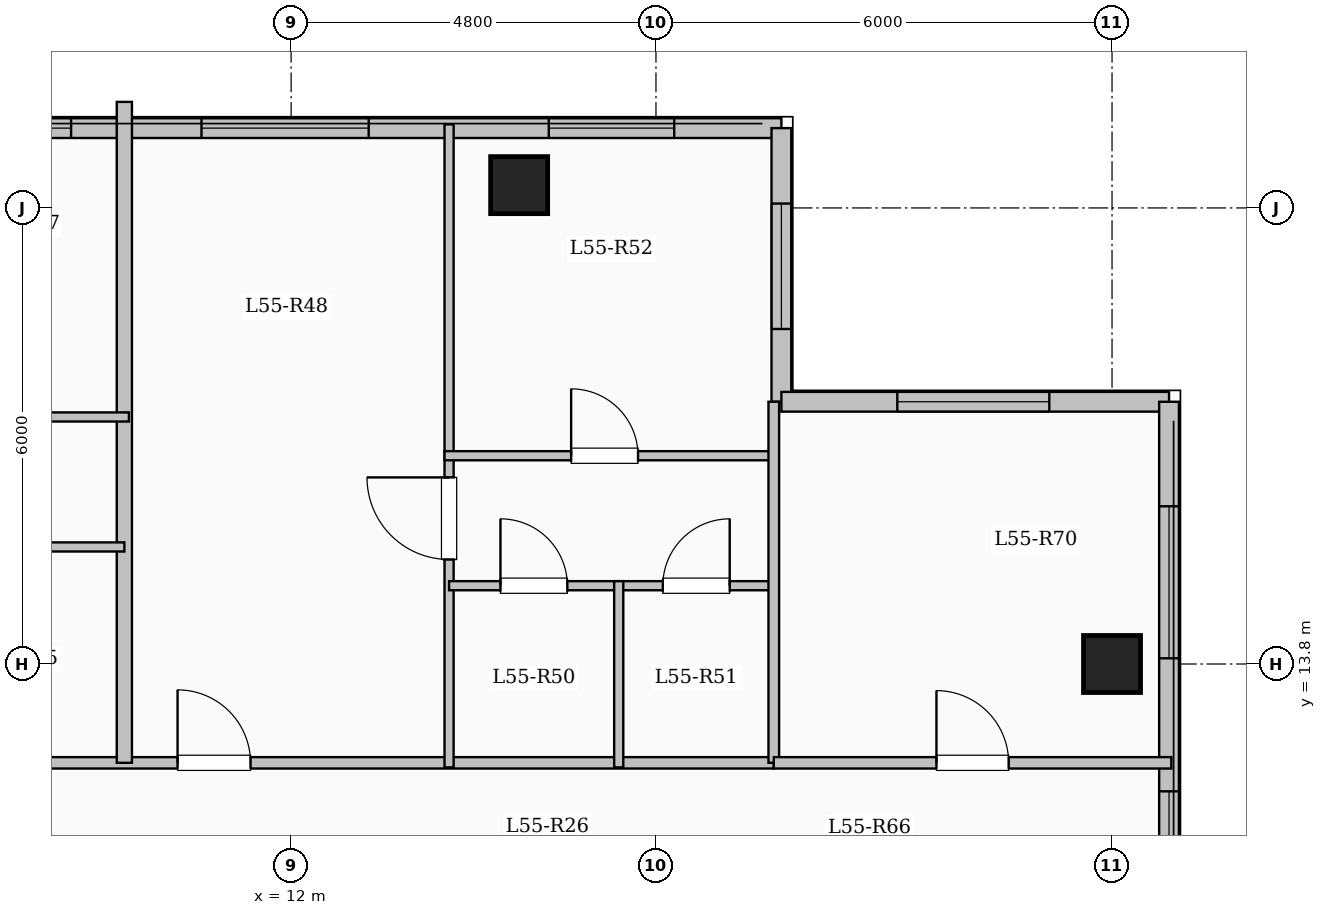
"""IFC4 building model, lengths in metres.
Left out: names, types, materials, properties, quantities, classifications, styles, units other than length and angle.
Written with IfcOpenShell. Run it as: python <this file> out.ifc"""

import sys

from ifc_helpers import new_model, si_unit, direction, frame, frame_2d, origin, origin_2d, place, context, subcontext, project, spatial, rectangle, extrude, element, fill, save


model = new_model("IFC4")
c1 = context("Model", 3, precision=1e-05, world=origin(), true_north=direction((0.0, 1.0)))
c2 = subcontext(c1, "Body", "Model", "MODEL_VIEW")
j1 = project(units=[si_unit("LENGTHUNIT", "METRE"), si_unit("PLANEANGLEUNIT", "RADIAN")], contexts=[c1])
p1 = place(None, origin())
s1 = spatial("IfcSite", under=j1, at=p1, CompositionType="ELEMENT")
p2 = place(p1, origin())
s2 = spatial("IfcBuilding", under=s1, at=p2, CompositionType="ELEMENT")
p3 = place(p2, frame((0.0, 0.0, 203.65)))
s3 = spatial("IfcBuildingStorey", under=s2, at=p3, CompositionType="ELEMENT", Elevation=203.65)
for number, where, z_axis, x_axis in (
    (1, (15.0, 20.1, 0.0), (0.0, 0.0, 1.0), (1.0, 0.0, 0.0)),
    (2, (22.8, 13.8, 0.0), (0.0, 0.0, 1.0), (1.0, 0.0, 0.0)),
):
    element("IfcColumn", number, at=place(p3, frame(where, z_axis=z_axis, x_axis=x_axis)), inside=s3, PredefinedType="COLUMN", context=c2, shape_type="SweptSolid", body=[
        extrude(rectangle(XDim=0.75, YDim=0.75, at=origin_2d()), origin(), (0.0, 0.0, 1.0), 3.35),
    ])
p4 = place(p3, frame((7.35, 20.85, 0.0), z_axis=(0.0, 0.0, 1.0), x_axis=(1.0, 0.0, 0.0)))
e3 = element("IfcWall", 3, at=p4, inside=s3, PredefinedType="SOLIDWALL", context=c2, shape_type="SweptSolid", body=[
    extrude(rectangle(XDim=11.1, YDim=0.26, at=frame_2d((5.55, 0.0))), origin(), (0.0, 0.0, 1.0), 3.1),
])
p5 = place(p4, frame((0.555, 0.0, 0.95)))
e4 = element("IfcOpeningElement", 4, at=p5, cuts=e3, PredefinedType="OPENING", context=c2, shape_type="SweptSolid", body=[
    extrude(rectangle(XDim=1.2, YDim=1.5, at=frame_2d((0.6, 0.75))), frame((0.0, 0.14, 0.0), z_axis=(0.0, -1.0, 0.0), x_axis=(1.0, 0.0, 0.0)), (0.0, 0.0, 1.0), 0.28),
])
p6 = place(p4, frame((3.471, 0.0, 0.9)))
e5 = element("IfcOpeningElement", 5, at=p6, cuts=e3, PredefinedType="OPENING", context=c2, shape_type="SweptSolid", body=[
    extrude(rectangle(XDim=2.2, YDim=1.75, at=frame_2d((1.1, 0.875))), frame((0.0, 0.14, 0.0), z_axis=(0.0, -1.0, 0.0), x_axis=(1.0, 0.0, 0.0)), (0.0, 0.0, 1.0), 0.28),
])
p7 = place(p4, frame((8.04, 0.0, 0.9)))
e6 = element("IfcOpeningElement", 6, at=p7, cuts=e3, PredefinedType="OPENING", context=c2, shape_type="SweptSolid", body=[
    extrude(rectangle(XDim=1.65, YDim=1.6, at=frame_2d((0.825, 0.8))), frame((0.0, 0.14, 0.0), z_axis=(0.0, -1.0, 0.0), x_axis=(1.0, 0.0, 0.0)), (0.0, 0.0, 1.0), 0.28),
])
p8 = place(p3, frame((18.45, 20.85, 0.0), z_axis=(0.0, 0.0, 1.0), x_axis=(0.0, -1.0, 0.0)))
e7 = element("IfcWall", 7, at=p8, inside=s3, PredefinedType="SOLIDWALL", context=c2, shape_type="SweptSolid", body=[
    extrude(rectangle(XDim=3.6, YDim=0.26, at=frame_2d((1.8, 0.0))), origin(), (0.0, 0.0, 1.0), 3.1),
])
p9 = place(p8, frame((0.992, 0.0, 0.9)))
e8 = element("IfcOpeningElement", 8, at=p9, cuts=e7, PredefinedType="OPENING", context=c2, shape_type="SweptSolid", body=[
    extrude(rectangle(XDim=1.65, YDim=1.6, at=frame_2d((0.825, 0.8))), frame((0.0, 0.14, 0.0), z_axis=(0.0, -1.0, 0.0), x_axis=(1.0, 0.0, 0.0)), (0.0, 0.0, 1.0), 0.28),
])
p10 = place(p3, frame((18.45, 17.25, 0.0), z_axis=(0.0, 0.0, 1.0), x_axis=(1.0, 0.0, 0.0)))
e9 = element("IfcWall", 9, at=p10, inside=s3, PredefinedType="SOLIDWALL", context=c2, shape_type="SweptSolid", body=[
    extrude(rectangle(XDim=5.1, YDim=0.26, at=frame_2d((2.55, 0.0))), origin(), (0.0, 0.0, 1.0), 3.1),
])
p11 = place(p10, frame((1.525, 0.0, 0.9)))
e10 = element("IfcOpeningElement", 10, at=p11, cuts=e9, PredefinedType="OPENING", context=c2, shape_type="SweptSolid", body=[
    extrude(rectangle(XDim=2.0, YDim=1.7, at=frame_2d((1.0, 0.85))), frame((0.0, 0.14, 0.0), z_axis=(0.0, -1.0, 0.0), x_axis=(1.0, 0.0, 0.0)), (0.0, 0.0, 1.0), 0.28),
])
p12 = place(p3, frame((23.55, 17.25, 0.0), z_axis=(0.0, 0.0, 1.0), x_axis=(0.0, -1.0, 0.0)))
e11 = element("IfcWall", 11, at=p12, inside=s3, PredefinedType="SOLIDWALL", context=c2, shape_type="SweptSolid", body=[
    extrude(rectangle(XDim=34.5, YDim=0.26, at=frame_2d((17.25, 0.0))), origin(), (0.0, 0.0, 1.0), 3.1),
])
p13 = place(p12, frame((1.375, 0.0, 0.9)))
e12 = element("IfcOpeningElement", 12, at=p13, cuts=e11, PredefinedType="OPENING", context=c2, shape_type="SweptSolid", body=[
    extrude(rectangle(XDim=2.0, YDim=1.7, at=frame_2d((1.0, 0.85))), frame((0.0, 0.14, 0.0), z_axis=(0.0, -1.0, 0.0), x_axis=(1.0, 0.0, 0.0)), (0.0, 0.0, 1.0), 0.28),
])
p14 = place(p12, frame((5.125, 0.0, 0.95)))
e13 = element("IfcOpeningElement", 13, at=p14, cuts=e11, PredefinedType="OPENING", context=c2, shape_type="SweptSolid", body=[
    extrude(rectangle(XDim=1.0, YDim=1.5, at=frame_2d((0.5, 0.75))), frame((0.0, 0.14, 0.0), z_axis=(0.0, -1.0, 0.0), x_axis=(1.0, 0.0, 0.0)), (0.0, 0.0, 1.0), 0.28),
])
p15 = place(p12, frame((8.375, 0.0, 0.9)))
e14 = element("IfcOpeningElement", 14, at=p15, cuts=e11, PredefinedType="OPENING", context=c2, shape_type="SweptSolid", body=[
    extrude(rectangle(XDim=2.0, YDim=1.7, at=frame_2d((1.0, 0.85))), frame((0.0, 0.14, 0.0), z_axis=(0.0, -1.0, 0.0), x_axis=(1.0, 0.0, 0.0)), (0.0, 0.0, 1.0), 0.28),
])
p16 = place(p12, frame((13.2, 0.0, 0.9)))
e15 = element("IfcOpeningElement", 15, at=p16, cuts=e11, PredefinedType="OPENING", context=c2, shape_type="SweptSolid", body=[
    extrude(rectangle(XDim=1.65, YDim=1.6, at=frame_2d((0.825, 0.8))), frame((0.0, 0.14, 0.0), z_axis=(0.0, -1.0, 0.0), x_axis=(1.0, 0.0, 0.0)), (0.0, 0.0, 1.0), 0.28),
])
p17 = place(p12, frame((19.05, 0.0, 0.9)))
e16 = element("IfcOpeningElement", 16, at=p17, cuts=e11, PredefinedType="OPENING", context=c2, shape_type="SweptSolid", body=[
    extrude(rectangle(XDim=2.2, YDim=1.75, at=frame_2d((1.1, 0.875))), frame((0.0, 0.14, 0.0), z_axis=(0.0, -1.0, 0.0), x_axis=(1.0, 0.0, 0.0)), (0.0, 0.0, 1.0), 0.28),
])
p18 = place(p12, frame((24.975, 0.0, 0.95)))
e17 = element("IfcOpeningElement", 17, at=p18, cuts=e11, PredefinedType="OPENING", context=c2, shape_type="SweptSolid", body=[
    extrude(rectangle(XDim=1.2, YDim=1.5, at=frame_2d((0.6, 0.75))), frame((0.0, 0.14, 0.0), z_axis=(0.0, -1.0, 0.0), x_axis=(1.0, 0.0, 0.0)), (0.0, 0.0, 1.0), 0.28),
])
p19 = place(p12, frame((29.475, 0.0, 0.9)))
e18 = element("IfcOpeningElement", 18, at=p19, cuts=e11, PredefinedType="OPENING", context=c2, shape_type="SweptSolid", body=[
    extrude(rectangle(XDim=2.2, YDim=1.75, at=frame_2d((1.1, 0.875))), frame((0.0, 0.14, 0.0), z_axis=(0.0, -1.0, 0.0), x_axis=(1.0, 0.0, 0.0)), (0.0, 0.0, 1.0), 0.28),
])
p20 = place(p3, frame((3.85, 12.5, 0.0), z_axis=(0.0, 0.0, 1.0), x_axis=(1.0, 0.0, 0.0)))
e19 = element("IfcWall", 19, at=p20, inside=s3, PredefinedType="PARTITIONING", context=c2, shape_type="SweptSolid", body=[
    extrude(rectangle(XDim=14.5, YDim=0.15, at=frame_2d((7.25, 0.0))), origin(), (0.0, 0.0, 1.0), 3.1),
])
p21 = place(p20, frame((0.7, 0.0, 0.0)))
e20 = element("IfcOpeningElement", 20, at=p21, cuts=e19, PredefinedType="OPENING", context=c2, shape_type="SweptSolid", body=[
    extrude(rectangle(XDim=0.96, YDim=2.15, at=frame_2d((0.48, 1.075))), frame((0.0, 0.085, 0.0), z_axis=(0.0, -1.0, 0.0), x_axis=(1.0, 0.0, 0.0)), (0.0, 0.0, 1.0), 0.17),
])
p22 = place(p20, frame((6.656, 0.0, 0.0)))
e21 = element("IfcOpeningElement", 21, at=p22, cuts=e19, PredefinedType="OPENING", context=c2, shape_type="SweptSolid", body=[
    extrude(rectangle(XDim=0.96, YDim=2.15, at=frame_2d((0.48, 1.075))), frame((0.0, 0.085, 0.0), z_axis=(0.0, -1.0, 0.0), x_axis=(1.0, 0.0, 0.0)), (0.0, 0.0, 1.0), 0.17),
])
p23 = place(p3, frame((9.806, 12.5, 0.0), z_axis=(0.0, 0.0, 1.0), x_axis=(0.0, 1.0, 0.0)))
e22 = element("IfcWall", 22, at=p23, inside=s3, PredefinedType="SOLIDWALL", context=c2, shape_type="SweptSolid", body=[
    extrude(rectangle(XDim=8.695, YDim=0.2, at=frame_2d((4.348, 0.0))), origin(), (0.0, 0.0, 1.0), 3.1),
])
p24 = place(p3, frame((6.95, 15.34, 0.0), z_axis=(0.0, 0.0, 1.0), x_axis=(1.0, 0.0, 0.0)))
e23 = element("IfcWall", 23, at=p24, inside=s3, PredefinedType="PARTITIONING", context=c2, shape_type="SweptSolid", body=[
    extrude(rectangle(XDim=2.856, YDim=0.12, at=frame_2d((1.428, 0.0))), origin(), (0.0, 0.0, 1.0), 2.725),
])
p25 = place(p24, frame((0.988, 0.0, 0.0)))
e24 = element("IfcOpeningElement", 24, at=p25, cuts=e23, PredefinedType="OPENING", context=c2, shape_type="SweptSolid", body=[
    extrude(rectangle(XDim=0.88, YDim=2.1, at=frame_2d((0.44, 1.05))), frame((0.0, 0.07, 0.0), z_axis=(0.0, -1.0, 0.0), x_axis=(1.0, 0.0, 0.0)), (0.0, 0.0, 1.0), 0.14),
])
p26 = place(p3, frame((4.204, 17.05, 0.0), z_axis=(0.0, 0.0, 1.0), x_axis=(1.0, 0.0, 0.0)))
e25 = element("IfcWall", 25, at=p26, inside=s3, PredefinedType="PARTITIONING", context=c2, shape_type="SweptSolid", body=[
    extrude(rectangle(XDim=5.662, YDim=0.12, at=frame_2d((2.831, 0.0))), origin(), (0.0, 0.0, 1.0), 2.725),
])
p27 = place(p26, frame((0.93, 0.0, 0.0)))
e26 = element("IfcOpeningElement", 26, at=p27, cuts=e25, PredefinedType="OPENING", context=c2, shape_type="SweptSolid", body=[
    extrude(rectangle(XDim=0.88, YDim=2.1, at=frame_2d((0.44, 1.05))), frame((0.0, 0.07, 0.0), z_axis=(0.0, -1.0, 0.0), x_axis=(1.0, 0.0, 0.0)), (0.0, 0.0, 1.0), 0.14),
])
p28 = place(p26, frame((3.671, 0.0, 0.0)))
e27 = element("IfcOpeningElement", 27, at=p28, cuts=e25, PredefinedType="OPENING", context=c2, shape_type="SweptSolid", body=[
    extrude(rectangle(XDim=0.88, YDim=2.1, at=frame_2d((0.44, 1.05))), frame((0.0, 0.07, 0.0), z_axis=(0.0, -1.0, 0.0), x_axis=(1.0, 0.0, 0.0)), (0.0, 0.0, 1.0), 0.14),
])
p29 = place(p3, frame((14.078, 12.44, 0.0), z_axis=(0.0, 0.0, 1.0), x_axis=(0.0, 1.0, 0.0)))
e28 = element("IfcWall", 28, at=p29, inside=s3, PredefinedType="PARTITIONING", context=c2, shape_type="SweptSolid", body=[
    extrude(rectangle(XDim=8.46, YDim=0.12, at=frame_2d((4.23, 0.0))), origin(), (0.0, 0.0, 1.0), 3.1),
])
p30 = place(p29, frame((2.735, 0.0, 0.0)))
e29 = element("IfcOpeningElement", 29, at=p30, cuts=e28, PredefinedType="OPENING", context=c2, shape_type="SweptSolid", body=[
    extrude(rectangle(XDim=1.08, YDim=2.15, at=frame_2d((0.54, 1.075))), frame((0.0, 0.07, 0.0), z_axis=(0.0, -1.0, 0.0), x_axis=(1.0, 0.0, 0.0)), (0.0, 0.0, 1.0), 0.14),
])
p31 = place(p3, frame((14.078, 14.83, 0.0), z_axis=(0.0, 0.0, 1.0), x_axis=(1.0, 0.0, 0.0)))
e30 = element("IfcWall", 30, at=p31, inside=s3, PredefinedType="PARTITIONING", context=c2, shape_type="SweptSolid", body=[
    extrude(rectangle(XDim=2.232, YDim=0.12, at=frame_2d((1.116, 0.0))), origin(), (0.0, 0.0, 1.0), 3.1),
])
p32 = place(p31, frame((0.676, 0.0, 0.0)))
e31 = element("IfcOpeningElement", 31, at=p32, cuts=e30, PredefinedType="OPENING", context=c2, shape_type="SweptSolid", body=[
    extrude(rectangle(XDim=0.88, YDim=2.1, at=frame_2d((0.44, 1.05))), frame((0.0, 0.07, 0.0), z_axis=(0.0, -1.0, 0.0), x_axis=(1.0, 0.0, 0.0)), (0.0, 0.0, 1.0), 0.14),
])
p33 = place(p3, frame((16.31, 14.83, 0.0), z_axis=(0.0, 0.0, 1.0), x_axis=(1.0, 0.0, 0.0)))
e32 = element("IfcWall", 32, at=p33, inside=s3, PredefinedType="PARTITIONING", context=c2, shape_type="SweptSolid", body=[
    extrude(rectangle(XDim=2.04, YDim=0.12, at=frame_2d((1.02, 0.0))), origin(), (0.0, 0.0, 1.0), 3.1),
])
p34 = place(p33, frame((0.58, 0.0, 0.0)))
e33 = element("IfcOpeningElement", 33, at=p34, cuts=e32, PredefinedType="OPENING", context=c2, shape_type="SweptSolid", body=[
    extrude(rectangle(XDim=0.88, YDim=2.1, at=frame_2d((0.44, 1.05))), frame((0.0, 0.07, 0.0), z_axis=(0.0, -1.0, 0.0), x_axis=(1.0, 0.0, 0.0)), (0.0, 0.0, 1.0), 0.14),
])
p35 = place(p3, frame((14.018, 16.54, 0.0), z_axis=(0.0, 0.0, 1.0), x_axis=(1.0, 0.0, 0.0)))
e34 = element("IfcWall", 34, at=p35, inside=s3, PredefinedType="PARTITIONING", context=c2, shape_type="SweptSolid", body=[
    extrude(rectangle(XDim=4.392, YDim=0.12, at=frame_2d((2.196, 0.0))), origin(), (0.0, 0.0, 1.0), 3.1),
])
p36 = place(p35, frame((1.666, 0.0, 0.0)))
e35 = element("IfcOpeningElement", 35, at=p36, cuts=e34, PredefinedType="OPENING", context=c2, shape_type="SweptSolid", body=[
    extrude(rectangle(XDim=0.88, YDim=2.1, at=frame_2d((0.44, 1.05))), frame((0.0, 0.07, 0.0), z_axis=(0.0, -1.0, 0.0), x_axis=(1.0, 0.0, 0.0)), (0.0, 0.0, 1.0), 0.14),
])
p37 = place(p3, frame((16.31, 12.44, 0.0), z_axis=(0.0, 0.0, 1.0), x_axis=(0.0, 1.0, 0.0)))
e36 = element("IfcWall", 36, at=p37, inside=s3, PredefinedType="PARTITIONING", context=c2, shape_type="SweptSolid", body=[
    extrude(rectangle(XDim=2.45, YDim=0.12, at=frame_2d((1.225, 0.0))), origin(), (0.0, 0.0, 1.0), 3.1),
])
p38 = place(p3, frame((18.35, 12.5, 0.0), z_axis=(0.0, 0.0, 1.0), x_axis=(0.0, 1.0, 0.0)))
e37 = element("IfcWall", 37, at=p38, inside=s3, PredefinedType="PARTITIONING", context=c2, shape_type="SweptSolid", body=[
    extrude(rectangle(XDim=4.75, YDim=0.14, at=frame_2d((2.375, 0.0))), origin(), (0.0, 0.0, 1.0), 3.1),
])
p39 = place(p3, frame((18.35, 12.5, 0.0), z_axis=(0.0, 0.0, 1.0), x_axis=(1.0, 0.0, 0.0)))
e38 = element("IfcWall", 38, at=p39, inside=s3, PredefinedType="PARTITIONING", context=c2, shape_type="SweptSolid", body=[
    extrude(rectangle(XDim=5.23, YDim=0.15, at=frame_2d((2.615, 0.0))), origin(), (0.0, 0.0, 1.0), 3.1),
])
p40 = place(p39, frame((2.14, 0.0, 0.0)))
e39 = element("IfcOpeningElement", 39, at=p40, cuts=e38, PredefinedType="OPENING", context=c2, shape_type="SweptSolid", body=[
    extrude(rectangle(XDim=0.95, YDim=2.15, at=frame_2d((0.475, 1.075))), frame((0.0, 0.085, 0.0), z_axis=(0.0, -1.0, 0.0), x_axis=(1.0, 0.0, 0.0)), (0.0, 0.0, 1.0), 0.17),
])
p41 = place(p5, origin())
e40 = element("IfcWindow", 40, at=p41, inside=s3, PartitioningType="SINGLE_PANEL", PredefinedType="WINDOW", context=c2, shape_type="SweptSolid", body=[
    extrude(rectangle(XDim=1.2, YDim=1.5, at=frame_2d((0.6, 0.75))), frame((0.0, 0.03, 0.0), z_axis=(0.0, -1.0, 0.0), x_axis=(1.0, 0.0, 0.0)), (0.0, 0.0, 1.0), 0.06),
])
fill(e4, e40)
p42 = place(p6, origin())
e41 = element("IfcWindow", 41, at=p42, inside=s3, PartitioningType="SINGLE_PANEL", PredefinedType="WINDOW", context=c2, shape_type="SweptSolid", body=[
    extrude(rectangle(XDim=2.2, YDim=1.75, at=frame_2d((1.1, 0.875))), frame((0.0, 0.03, 0.0), z_axis=(0.0, -1.0, 0.0), x_axis=(1.0, 0.0, 0.0)), (0.0, 0.0, 1.0), 0.06),
])
fill(e5, e41)
p43 = place(p7, origin())
e42 = element("IfcWindow", 42, at=p43, inside=s3, PartitioningType="SINGLE_PANEL", PredefinedType="WINDOW", context=c2, shape_type="SweptSolid", body=[
    extrude(rectangle(XDim=1.65, YDim=1.6, at=frame_2d((0.825, 0.8))), frame((0.0, 0.03, 0.0), z_axis=(0.0, -1.0, 0.0), x_axis=(1.0, 0.0, 0.0)), (0.0, 0.0, 1.0), 0.06),
])
fill(e6, e42)
p44 = place(p9, origin())
e43 = element("IfcWindow", 43, at=p44, inside=s3, PartitioningType="SINGLE_PANEL", PredefinedType="WINDOW", context=c2, shape_type="SweptSolid", body=[
    extrude(rectangle(XDim=1.65, YDim=1.6, at=frame_2d((0.825, 0.8))), frame((0.0, 0.03, 0.0), z_axis=(0.0, -1.0, 0.0), x_axis=(1.0, 0.0, 0.0)), (0.0, 0.0, 1.0), 0.06),
])
fill(e8, e43)
p45 = place(p11, origin())
e44 = element("IfcWindow", 44, at=p45, inside=s3, PartitioningType="SINGLE_PANEL", PredefinedType="WINDOW", context=c2, shape_type="SweptSolid", body=[
    extrude(rectangle(XDim=2.0, YDim=1.7, at=frame_2d((1.0, 0.85))), frame((0.0, 0.03, 0.0), z_axis=(0.0, -1.0, 0.0), x_axis=(1.0, 0.0, 0.0)), (0.0, 0.0, 1.0), 0.06),
])
fill(e10, e44)
p46 = place(p13, origin())
e45 = element("IfcWindow", 45, at=p46, inside=s3, PartitioningType="SINGLE_PANEL", PredefinedType="WINDOW", context=c2, shape_type="SweptSolid", body=[
    extrude(rectangle(XDim=2.0, YDim=1.7, at=frame_2d((1.0, 0.85))), frame((0.0, 0.03, 0.0), z_axis=(0.0, -1.0, 0.0), x_axis=(1.0, 0.0, 0.0)), (0.0, 0.0, 1.0), 0.06),
])
fill(e12, e45)
p47 = place(p14, origin())
e46 = element("IfcWindow", 46, at=p47, inside=s3, PartitioningType="SINGLE_PANEL", PredefinedType="WINDOW", context=c2, shape_type="SweptSolid", body=[
    extrude(rectangle(XDim=1.0, YDim=1.5, at=frame_2d((0.5, 0.75))), frame((0.0, 0.03, 0.0), z_axis=(0.0, -1.0, 0.0), x_axis=(1.0, 0.0, 0.0)), (0.0, 0.0, 1.0), 0.06),
])
fill(e13, e46)
p48 = place(p22, origin())
e47 = element("IfcDoor", 47, at=p48, inside=s3, OperationType="SINGLE_SWING_LEFT", PredefinedType="DOOR", context=c2, shape_type="SweptSolid", body=[
    extrude(rectangle(XDim=0.96, YDim=2.15, at=frame_2d((0.48, 1.075))), frame((0.0, 0.025, 0.0), z_axis=(0.0, -1.0, 0.0), x_axis=(1.0, 0.0, 0.0)), (0.0, 0.0, 1.0), 0.05),
])
fill(e21, e47)
p49 = place(p30, origin())
e48 = element("IfcDoor", 48, at=p49, inside=s3, OperationType="SINGLE_SWING_RIGHT", PredefinedType="DOOR", context=c2, shape_type="SweptSolid", body=[
    extrude(rectangle(XDim=1.08, YDim=2.15, at=frame_2d((0.54, 1.075))), frame((0.0, 0.025, 0.0), z_axis=(0.0, -1.0, 0.0), x_axis=(1.0, 0.0, 0.0)), (0.0, 0.0, 1.0), 0.05),
])
fill(e29, e48)
p50 = place(p32, origin())
e49 = element("IfcDoor", 49, at=p50, inside=s3, OperationType="SINGLE_SWING_LEFT", PredefinedType="DOOR", context=c2, shape_type="SweptSolid", body=[
    extrude(rectangle(XDim=0.88, YDim=2.1, at=frame_2d((0.44, 1.05))), frame((0.0, 0.025, 0.0), z_axis=(0.0, -1.0, 0.0), x_axis=(1.0, 0.0, 0.0)), (0.0, 0.0, 1.0), 0.05),
])
fill(e31, e49)
p51 = place(p34, origin())
e50 = element("IfcDoor", 50, at=p51, inside=s3, OperationType="SINGLE_SWING_RIGHT", PredefinedType="DOOR", context=c2, shape_type="SweptSolid", body=[
    extrude(rectangle(XDim=0.88, YDim=2.1, at=frame_2d((0.44, 1.05))), frame((0.0, 0.025, 0.0), z_axis=(0.0, -1.0, 0.0), x_axis=(1.0, 0.0, 0.0)), (0.0, 0.0, 1.0), 0.05),
])
fill(e33, e50)
p52 = place(p36, origin())
e51 = element("IfcDoor", 51, at=p52, inside=s3, OperationType="SINGLE_SWING_LEFT", PredefinedType="DOOR", context=c2, shape_type="SweptSolid", body=[
    extrude(rectangle(XDim=0.88, YDim=2.1, at=frame_2d((0.44, 1.05))), frame((0.0, 0.025, 0.0), z_axis=(0.0, -1.0, 0.0), x_axis=(1.0, 0.0, 0.0)), (0.0, 0.0, 1.0), 0.05),
])
fill(e35, e51)
p53 = place(p40, origin())
e52 = element("IfcDoor", 52, at=p53, inside=s3, OperationType="SINGLE_SWING_LEFT", PredefinedType="DOOR", context=c2, shape_type="SweptSolid", body=[
    extrude(rectangle(XDim=0.95, YDim=2.15, at=frame_2d((0.475, 1.075))), frame((0.0, 0.025, 0.0), z_axis=(0.0, -1.0, 0.0), x_axis=(1.0, 0.0, 0.0)), (0.0, 0.0, 1.0), 0.05),
])
fill(e39, e52)
save(model, sys.argv[1])
